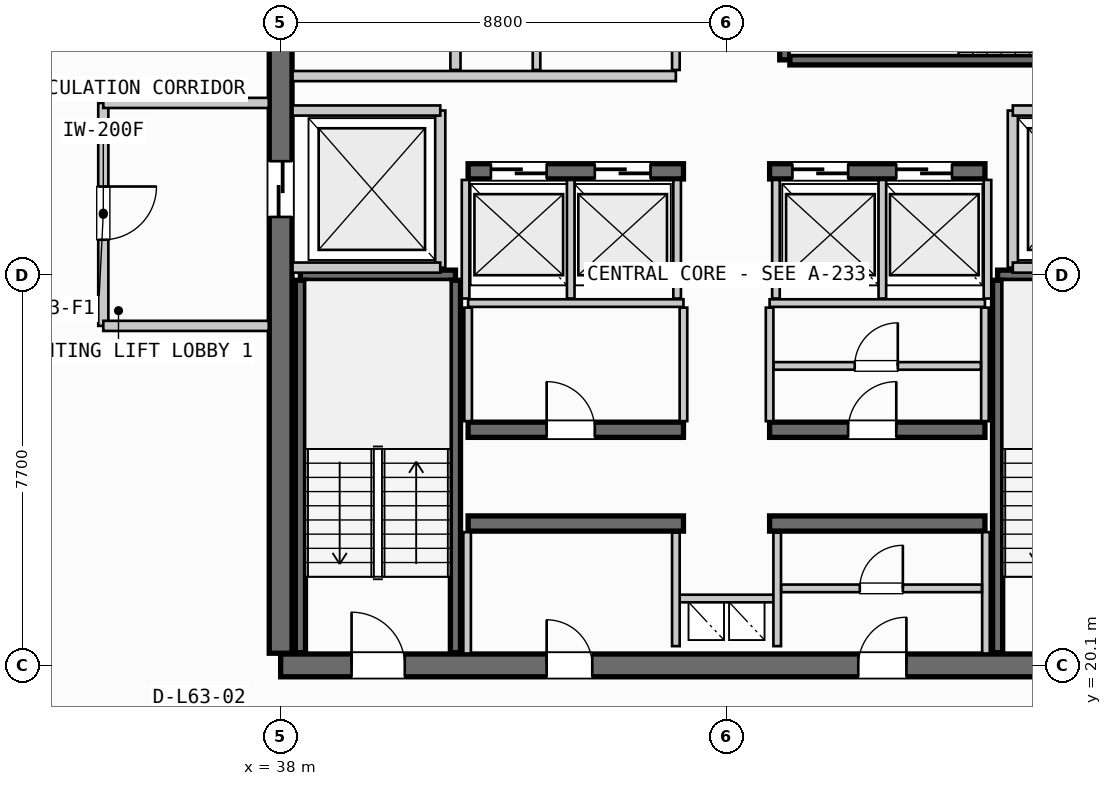
"""IFC4 building model, lengths in metres.
Left out: names, types, materials, properties, quantities, classifications, styles, units other than length and angle.
Written with IfcOpenShell. Run it as: python <this file> out.ifc"""

import sys

from ifc_helpers import new_model, si_unit, direction, frame, frame_2d, origin, place, context, subcontext, project, spatial, rectangle, extrude, source, transform, mapped, element, fill, save


model = new_model("IFC4")
c1 = context("Model", 3, precision=1e-05, world=origin(), true_north=direction((0.0, 1.0)))
c2 = subcontext(c1, "Body", "Model", "MODEL_VIEW")
j1 = project(units=[si_unit("LENGTHUNIT", "METRE"), si_unit("PLANEANGLEUNIT", "RADIAN")], contexts=[c1])
p1 = place(None, origin())
s1 = spatial("IfcSite", under=j1, at=p1, CompositionType="ELEMENT")
p2 = place(p1, origin())
s2 = spatial("IfcBuilding", under=s1, at=p2, CompositionType="ELEMENT")
p3 = place(p2, frame((0.0, 0.0, 242.2)))
s3 = spatial("IfcBuildingStorey", under=s2, at=p3, CompositionType="ELEMENT", Elevation=242.2)
p4 = place(p3, frame((38.0, 20.1, 0.0), z_axis=(0.0, 0.0, 1.0), x_axis=(1.0, 0.0, 0.0)))
e1 = element("IfcWall", 1, at=p4, inside=s3, PredefinedType="SHEAR", context=c2, shape_type="SweptSolid", body=[
    extrude(rectangle(XDim=17.6, YDim=0.45, at=frame_2d((8.8, 0.0))), origin(), (0.0, 0.0, 1.0), 3.21),
])
p5 = place(p4, frame((1.4, 0.0, 0.0)))
e2 = element("IfcOpeningElement", 2, at=p5, cuts=e1, PredefinedType="OPENING", context=c2, shape_type="SweptSolid", body=[
    extrude(rectangle(XDim=1.05, YDim=2.15, at=frame_2d((0.525, 1.075))), frame((0.0, 0.235, 0.0), z_axis=(0.0, -1.0, 0.0), x_axis=(1.0, 0.0, 0.0)), (0.0, 0.0, 1.0), 0.47),
])
p6 = place(p4, frame((15.15, 0.0, 0.0)))
e3 = element("IfcOpeningElement", 3, at=p6, cuts=e1, PredefinedType="OPENING", context=c2, shape_type="SweptSolid", body=[
    extrude(rectangle(XDim=1.05, YDim=2.15, at=frame_2d((0.525, 1.075))), frame((0.0, 0.235, 0.0), z_axis=(0.0, -1.0, 0.0), x_axis=(1.0, 0.0, 0.0)), (0.0, 0.0, 1.0), 0.47),
])
p7 = place(p4, frame((5.25, 0.0, 0.0)))
e4 = element("IfcOpeningElement", 4, at=p7, cuts=e1, PredefinedType="OPENING", context=c2, shape_type="SweptSolid", body=[
    extrude(rectangle(XDim=0.9, YDim=2.15, at=frame_2d((0.45, 1.075))), frame((0.0, 0.235, 0.0), z_axis=(0.0, -1.0, 0.0), x_axis=(1.0, 0.0, 0.0)), (0.0, 0.0, 1.0), 0.47),
])
p8 = place(p4, frame((11.4, 0.0, 0.0)))
e5 = element("IfcOpeningElement", 5, at=p8, cuts=e1, PredefinedType="OPENING", context=c2, shape_type="SweptSolid", body=[
    extrude(rectangle(XDim=0.95, YDim=2.15, at=frame_2d((0.475, 1.075))), frame((0.0, 0.235, 0.0), z_axis=(0.0, -1.0, 0.0), x_axis=(1.0, 0.0, 0.0)), (0.0, 0.0, 1.0), 0.47),
])
p9 = place(p3, frame((38.0, 35.26, 0.0), z_axis=(0.0, 0.0, 1.0), x_axis=(0.0, -1.0, 0.0)))
e6 = element("IfcWall", 6, at=p9, inside=s3, PredefinedType="SHEAR", context=c2, shape_type="SweptSolid", body=[
    extrude(rectangle(XDim=14.92, YDim=0.45, at=frame_2d((7.46, 0.0))), origin(), (0.0, 0.0, 1.0), 3.21),
])
p10 = place(p9, frame((5.21, 0.0, 0.0)))
e7 = element("IfcOpeningElement", 7, at=p10, cuts=e6, PredefinedType="OPENING", context=c2, shape_type="SweptSolid", body=[
    extrude(rectangle(XDim=1.1, YDim=2.2, at=frame_2d((0.55, 1.1))), frame((0.0, 0.235, 0.0), z_axis=(0.0, -1.0, 0.0), x_axis=(1.0, 0.0, 0.0)), (0.0, 0.0, 1.0), 0.47),
])
for number, where, z_axis, x_axis in (
    (8, (41.7, 22.9, 0.0), (0.0, 0.0, 1.0), (1.0, 0.0, 0.0)),
    (9, (47.65, 22.9, 0.0), (0.0, 0.0, 1.0), (1.0, 0.0, 0.0)),
):
    element("IfcWall", number, at=place(p3, frame(where, z_axis=z_axis, x_axis=x_axis)), inside=s3, PredefinedType="SHEAR", context=c2, shape_type="SweptSolid", body=[
        extrude(rectangle(XDim=4.25, YDim=0.3, at=frame_2d((2.125, 0.0))), origin(), (0.0, 0.0, 1.0), 3.21),
    ])
p11 = place(p3, frame((41.7, 24.75, 0.0), z_axis=(0.0, 0.0, 1.0), x_axis=(1.0, 0.0, 0.0)))
e10 = element("IfcWall", 10, at=p11, inside=s3, PredefinedType="SHEAR", context=c2, shape_type="SweptSolid", body=[
    extrude(rectangle(XDim=4.25, YDim=0.3, at=frame_2d((2.125, 0.0))), origin(), (0.0, 0.0, 1.0), 3.21),
])
p12 = place(p11, frame((1.55, 0.0, 0.0)))
e11 = element("IfcOpeningElement", 11, at=p12, cuts=e10, PredefinedType="OPENING", context=c2, shape_type="SweptSolid", body=[
    extrude(rectangle(XDim=0.95, YDim=2.15, at=frame_2d((0.475, 1.075))), frame((0.0, 0.16, 0.0), z_axis=(0.0, -1.0, 0.0), x_axis=(1.0, 0.0, 0.0)), (0.0, 0.0, 1.0), 0.32),
])
p13 = place(p3, frame((47.65, 24.75, 0.0), z_axis=(0.0, 0.0, 1.0), x_axis=(1.0, 0.0, 0.0)))
e12 = element("IfcWall", 12, at=p13, inside=s3, PredefinedType="SHEAR", context=c2, shape_type="SweptSolid", body=[
    extrude(rectangle(XDim=4.25, YDim=0.3, at=frame_2d((2.125, 0.0))), origin(), (0.0, 0.0, 1.0), 3.21),
])
p14 = place(p13, frame((1.55, 0.0, 0.0)))
e13 = element("IfcOpeningElement", 13, at=p14, cuts=e12, PredefinedType="OPENING", context=c2, shape_type="SweptSolid", body=[
    extrude(rectangle(XDim=0.95, YDim=2.15, at=frame_2d((0.475, 1.075))), frame((0.0, 0.16, 0.0), z_axis=(0.0, -1.0, 0.0), x_axis=(1.0, 0.0, 0.0)), (0.0, 0.0, 1.0), 0.32),
])
p15 = place(p3, frame((41.7, 29.85, 0.0), z_axis=(0.0, 0.0, 1.0), x_axis=(1.0, 0.0, 0.0)))
e14 = element("IfcWall", 14, at=p15, inside=s3, PredefinedType="SHEAR", context=c2, shape_type="SweptSolid", body=[
    extrude(rectangle(XDim=4.25, YDim=0.3, at=frame_2d((2.125, 0.0))), origin(), (0.0, 0.0, 1.0), 3.21),
])
p16 = place(p15, frame((0.45, 0.0, 0.0)))
e15 = element("IfcOpeningElement", 15, at=p16, cuts=e14, PredefinedType="OPENING", context=c2, shape_type="SweptSolid", body=[
    extrude(rectangle(XDim=1.1, YDim=2.2, at=frame_2d((0.55, 1.1))), frame((0.0, 0.16, 0.0), z_axis=(0.0, -1.0, 0.0), x_axis=(1.0, 0.0, 0.0)), (0.0, 0.0, 1.0), 0.32),
])
p17 = place(p15, frame((2.5, 0.0, 0.0)))
e16 = element("IfcOpeningElement", 16, at=p17, cuts=e14, PredefinedType="OPENING", context=c2, shape_type="SweptSolid", body=[
    extrude(rectangle(XDim=1.1, YDim=2.2, at=frame_2d((0.55, 1.1))), frame((0.0, 0.16, 0.0), z_axis=(0.0, -1.0, 0.0), x_axis=(1.0, 0.0, 0.0)), (0.0, 0.0, 1.0), 0.32),
])
p18 = place(p3, frame((47.65, 29.85, 0.0), z_axis=(0.0, 0.0, 1.0), x_axis=(1.0, 0.0, 0.0)))
e17 = element("IfcWall", 17, at=p18, inside=s3, PredefinedType="SHEAR", context=c2, shape_type="SweptSolid", body=[
    extrude(rectangle(XDim=4.25, YDim=0.3, at=frame_2d((2.125, 0.0))), origin(), (0.0, 0.0, 1.0), 3.21),
])
p19 = place(p18, frame((0.45, 0.0, 0.0)))
e18 = element("IfcOpeningElement", 18, at=p19, cuts=e17, PredefinedType="OPENING", context=c2, shape_type="SweptSolid", body=[
    extrude(rectangle(XDim=1.1, YDim=2.2, at=frame_2d((0.55, 1.1))), frame((0.0, 0.16, 0.0), z_axis=(0.0, -1.0, 0.0), x_axis=(1.0, 0.0, 0.0)), (0.0, 0.0, 1.0), 0.32),
])
p20 = place(p18, frame((2.5, 0.0, 0.0)))
e19 = element("IfcOpeningElement", 19, at=p20, cuts=e17, PredefinedType="OPENING", context=c2, shape_type="SweptSolid", body=[
    extrude(rectangle(XDim=1.1, YDim=2.2, at=frame_2d((0.55, 1.1))), frame((0.0, 0.16, 0.0), z_axis=(0.0, -1.0, 0.0), x_axis=(1.0, 0.0, 0.0)), (0.0, 0.0, 1.0), 0.32),
])
p21 = place(p3, frame((38.39, 27.8, 0.0), z_axis=(0.0, 0.0, 1.0), x_axis=(1.0, 0.0, 0.0)))
e20 = element("IfcWall", 20, at=p21, inside=s3, PredefinedType="SHEAR", context=c2, shape_type="SweptSolid", body=[
    extrude(rectangle(XDim=3.06, YDim=0.2, at=frame_2d((1.53, 0.0))), origin(), (0.0, 0.0, 1.0), 3.21),
])
for number, where, z_axis, x_axis in (
    (21, (41.45, 27.7, 0.0), (0.0, 0.0, 1.0), (0.0, -1.0, 0.0)),
    (22, (38.39, 20.35, 0.0), (0.0, 0.0, 1.0), (0.0, 1.0, 0.0)),
):
    element("IfcWall", number, at=place(p3, frame(where, z_axis=z_axis, x_axis=x_axis)), inside=s3, PredefinedType="SHEAR", context=c2, shape_type="SweptSolid", body=[
        extrude(rectangle(XDim=7.35, YDim=0.2, at=frame_2d((3.675, 0.0))), origin(), (0.0, 0.0, 1.0), 3.21),
    ])
p22 = place(p3, frame((52.15, 27.8, 0.0), z_axis=(0.0, 0.0, 1.0), x_axis=(1.0, 0.0, 0.0)))
e23 = element("IfcWall", 23, at=p22, inside=s3, PredefinedType="SHEAR", context=c2, shape_type="SweptSolid", body=[
    extrude(rectangle(XDim=3.06, YDim=0.2, at=frame_2d((1.53, 0.0))), origin(), (0.0, 0.0, 1.0), 3.21),
])
p23 = place(p3, frame((52.15, 20.35, 0.0), z_axis=(0.0, 0.0, 1.0), x_axis=(0.0, 1.0, 0.0)))
e24 = element("IfcWall", 24, at=p23, inside=s3, PredefinedType="SHEAR", context=c2, shape_type="SweptSolid", body=[
    extrude(rectangle(XDim=7.35, YDim=0.2, at=frame_2d((3.675, 0.0))), origin(), (0.0, 0.0, 1.0), 3.21),
])
p24 = place(p3, frame((47.95, 32.05, 0.0), z_axis=(0.0, 0.0, 1.0), x_axis=(0.0, 1.0, 0.0)))
e25 = element("IfcWall", 25, at=p24, inside=s3, PredefinedType="SHEAR", context=c2, shape_type="SweptSolid", body=[
    extrude(rectangle(XDim=3.06, YDim=0.2, at=frame_2d((1.53, 0.0))), origin(), (0.0, 0.0, 1.0), 3.21),
])
p25 = place(p3, frame((55.4, 32.05, 0.0), z_axis=(0.0, 0.0, 1.0), x_axis=(-1.0, 0.0, 0.0)))
e26 = element("IfcWall", 26, at=p25, inside=s3, PredefinedType="SHEAR", context=c2, shape_type="SweptSolid", body=[
    extrude(rectangle(XDim=7.35, YDim=0.2, at=frame_2d((3.675, 0.0))), origin(), (0.0, 0.0, 1.0), 3.21),
])
p26 = place(p3, frame((45.8, 21.42, 0.0), z_axis=(0.0, 0.0, 1.0), x_axis=(1.0, 0.0, 0.0)))
e27 = element("IfcWall", 27, at=p26, inside=s3, PredefinedType="PARTITIONING", context=c2, shape_type="SweptSolid", body=[
    extrude(rectangle(XDim=2.0, YDim=0.15, at=frame_2d((1.0, 0.0))), origin(), (0.0, 0.0, 1.0), 2.28),
])
for number, where, z_axis, x_axis in (
    (28, (45.8, 20.48, 0.0), (0.0, 0.0, 1.0), (0.0, 1.0, 0.0)),
    (29, (47.8, 20.48, 0.0), (0.0, 0.0, 1.0), (0.0, 1.0, 0.0)),
):
    element("IfcWall", number, at=place(p3, frame(where, z_axis=z_axis, x_axis=x_axis)), inside=s3, PredefinedType="PARTITIONING", context=c2, shape_type="SweptSolid", body=[
        extrude(rectangle(XDim=2.24, YDim=0.15, at=frame_2d((1.12, 0.0))), origin(), (0.0, 0.0, 1.0), 2.28),
    ])
p27 = place(p3, frame((41.15, 27.95, 0.0), z_axis=(0.0, 0.0, 1.0), x_axis=(0.0, 1.0, 0.0)))
e30 = element("IfcWall", 30, at=p27, inside=s3, PredefinedType="PARTITIONING", context=c2, shape_type="SweptSolid", body=[
    extrude(rectangle(XDim=3.1, YDim=0.2, at=frame_2d((1.55, 0.0))), origin(), (0.0, 0.0, 1.0), 2.28),
])
for number, where, z_axis, x_axis in (
    (31, (38.235, 27.95, 0.0), (0.0, 0.0, 1.0), (1.0, 0.0, 0.0)),
    (32, (38.235, 31.05, 0.0), (0.0, 0.0, 1.0), (1.0, 0.0, 0.0)),
):
    element("IfcWall", number, at=place(p3, frame(where, z_axis=z_axis, x_axis=x_axis)), inside=s3, PredefinedType="PARTITIONING", context=c2, shape_type="SweptSolid", body=[
        extrude(rectangle(XDim=2.915, YDim=0.2, at=frame_2d((1.458, 0.0))), origin(), (0.0, 0.0, 1.0), 2.28),
    ])
p28 = place(p3, frame((34.5, 31.2, 0.0), z_axis=(0.0, 0.0, 1.0), x_axis=(0.0, -1.0, 0.0)))
e33 = element("IfcWall", 33, at=p28, inside=s3, PredefinedType="PARTITIONING", context=c2, shape_type="SweptSolid", body=[
    extrude(rectangle(XDim=4.4, YDim=0.2, at=frame_2d((2.2, 0.0))), origin(), (0.0, 0.0, 1.0), 2.28),
])
p29 = place(p28, frame((1.65, 0.0, 0.0)))
e34 = element("IfcOpeningElement", 34, at=p29, cuts=e33, PredefinedType="OPENING", context=c2, shape_type="SweptSolid", body=[
    extrude(rectangle(XDim=1.05, YDim=2.15, at=frame_2d((0.525, 1.075))), frame((0.0, 0.11, 0.0), z_axis=(0.0, -1.0, 0.0), x_axis=(1.0, 0.0, 0.0)), (0.0, 0.0, 1.0), 0.22),
])
for number, where, z_axis, x_axis in (
    (35, (34.5, 26.8, 0.0), (0.0, 0.0, 1.0), (1.0, 0.0, 0.0)),
    (36, (34.5, 31.2, 0.0), (0.0, 0.0, 1.0), (1.0, 0.0, 0.0)),
):
    element("IfcWall", number, at=place(p3, frame(where, z_axis=z_axis, x_axis=x_axis)), inside=s3, PredefinedType="PARTITIONING", context=c2, shape_type="SweptSolid", body=[
        extrude(rectangle(XDim=3.265, YDim=0.2, at=frame_2d((1.632, 0.0))), origin(), (0.0, 0.0, 1.0), 2.28),
    ])
p30 = place(p3, frame((52.45, 27.95, 0.0), z_axis=(0.0, 0.0, 1.0), x_axis=(0.0, 1.0, 0.0)))
e37 = element("IfcWall", 37, at=p30, inside=s3, PredefinedType="PARTITIONING", context=c2, shape_type="SweptSolid", body=[
    extrude(rectangle(XDim=3.1, YDim=0.2, at=frame_2d((1.55, 0.0))), origin(), (0.0, 0.0, 1.0), 2.28),
])
for number, where, z_axis, x_axis in (
    (38, (52.45, 27.95, 0.0), (0.0, 0.0, 1.0), (1.0, 0.0, 0.0)),
    (39, (52.45, 31.05, 0.0), (0.0, 0.0, 1.0), (1.0, 0.0, 0.0)),
):
    element("IfcWall", number, at=place(p3, frame(where, z_axis=z_axis, x_axis=x_axis)), inside=s3, PredefinedType="PARTITIONING", context=c2, shape_type="SweptSolid", body=[
        extrude(rectangle(XDim=2.915, YDim=0.2, at=frame_2d((1.458, 0.0))), origin(), (0.0, 0.0, 1.0), 2.28),
    ])
for number, where, z_axis, x_axis in (
    (40, (41.68, 20.335, 0.0), (0.0, 0.0, 1.0), (0.0, 1.0, 0.0)),
    (41, (51.92, 20.335, 0.0), (0.0, 0.0, 1.0), (0.0, 1.0, 0.0)),
):
    element("IfcWall", number, at=place(p3, frame(where, z_axis=z_axis, x_axis=x_axis)), inside=s3, PredefinedType="PARTITIONING", context=c2, shape_type="SweptSolid", body=[
        extrude(rectangle(XDim=2.395, YDim=0.15, at=frame_2d((1.198, 0.0))), origin(), (0.0, 0.0, 1.0), 2.28),
    ])
p31 = place(p3, frame((47.88, 21.62, 0.0), z_axis=(0.0, 0.0, 1.0), x_axis=(1.0, 0.0, 0.0)))
e42 = element("IfcWall", 42, at=p31, inside=s3, PredefinedType="PARTITIONING", context=c2, shape_type="SweptSolid", body=[
    extrude(rectangle(XDim=3.96, YDim=0.15, at=frame_2d((1.98, 0.0))), origin(), (0.0, 0.0, 1.0), 2.28),
])
p32 = place(p31, frame((1.55, 0.0, 0.0)))
e43 = element("IfcOpeningElement", 43, at=p32, cuts=e42, PredefinedType="OPENING", context=c2, shape_type="SweptSolid", body=[
    extrude(rectangle(XDim=0.85, YDim=2.15, at=frame_2d((0.425, 1.075))), frame((0.0, 0.085, 0.0), z_axis=(0.0, -1.0, 0.0), x_axis=(1.0, 0.0, 0.0)), (0.0, 0.0, 1.0), 0.17),
])
for number, where, z_axis, x_axis in (
    (44, (41.7, 27.25, 0.0), (0.0, 0.0, 1.0), (1.0, 0.0, 0.0)),
    (45, (47.65, 27.25, 0.0), (0.0, 0.0, 1.0), (1.0, 0.0, 0.0)),
):
    element("IfcWall", number, at=place(p3, frame(where, z_axis=z_axis, x_axis=x_axis)), inside=s3, PredefinedType="PARTITIONING", context=c2, shape_type="SweptSolid", body=[
        extrude(rectangle(XDim=4.25, YDim=0.15, at=frame_2d((2.125, 0.0))), origin(), (0.0, 0.0, 1.0), 2.28),
    ])
for number, where, z_axis, x_axis in (
    (46, (41.7, 24.92, 0.0), (0.0, 0.0, 1.0), (0.0, 1.0, 0.0)),
    (47, (45.95, 24.92, 0.0), (0.0, 0.0, 1.0), (0.0, 1.0, 0.0)),
    (48, (47.65, 24.92, 0.0), (0.0, 0.0, 1.0), (0.0, 1.0, 0.0)),
    (49, (51.9, 24.92, 0.0), (0.0, 0.0, 1.0), (0.0, 1.0, 0.0)),
):
    element("IfcWall", number, at=place(p3, frame(where, z_axis=z_axis, x_axis=x_axis)), inside=s3, PredefinedType="PARTITIONING", context=c2, shape_type="SweptSolid", body=[
        extrude(rectangle(XDim=2.24, YDim=0.15, at=frame_2d((1.12, 0.0))), origin(), (0.0, 0.0, 1.0), 2.28),
    ])
p33 = place(p3, frame((47.73, 26.01, 0.0), z_axis=(0.0, 0.0, 1.0), x_axis=(1.0, 0.0, 0.0)))
e50 = element("IfcWall", 50, at=p33, inside=s3, PredefinedType="PARTITIONING", context=c2, shape_type="SweptSolid", body=[
    extrude(rectangle(XDim=4.09, YDim=0.15, at=frame_2d((2.045, 0.0))), origin(), (0.0, 0.0, 1.0), 2.28),
])
p34 = place(p33, frame((1.6, 0.0, 0.0)))
e51 = element("IfcOpeningElement", 51, at=p34, cuts=e50, PredefinedType="OPENING", context=c2, shape_type="SweptSolid", body=[
    extrude(rectangle(XDim=0.85, YDim=2.15, at=frame_2d((0.425, 1.075))), frame((0.0, 0.085, 0.0), z_axis=(0.0, -1.0, 0.0), x_axis=(1.0, 0.0, 0.0)), (0.0, 0.0, 1.0), 0.17),
])
for number, where, z_axis, x_axis in (
    (52, (41.65, 27.34, 0.0), (0.0, 0.0, 1.0), (0.0, 1.0, 0.0)),
    (53, (43.725, 27.34, 0.0), (0.0, 0.0, 1.0), (0.0, 1.0, 0.0)),
    (54, (45.825, 27.34, 0.0), (0.0, 0.0, 1.0), (0.0, 1.0, 0.0)),
    (55, (47.775, 27.34, 0.0), (0.0, 0.0, 1.0), (0.0, 1.0, 0.0)),
    (56, (49.875, 27.34, 0.0), (0.0, 0.0, 1.0), (0.0, 1.0, 0.0)),
    (57, (51.95, 27.34, 0.0), (0.0, 0.0, 1.0), (0.0, 1.0, 0.0)),
):
    element("IfcWall", number, at=place(p3, frame(where, z_axis=z_axis, x_axis=x_axis)), inside=s3, PredefinedType="PARTITIONING", context=c2, shape_type="SweptSolid", body=[
        extrude(rectangle(XDim=2.34, YDim=0.15, at=frame_2d((1.17, 0.0))), origin(), (0.0, 0.0, 1.0), 2.28),
    ])
p35 = place(p3, frame((41.45, 31.85, 0.0), z_axis=(0.0, 0.0, 1.0), x_axis=(0.0, 1.0, 0.0)))
e58 = element("IfcWall", 58, at=p35, inside=s3, PredefinedType="PARTITIONING", context=c2, shape_type="SweptSolid", body=[
    extrude(rectangle(XDim=3.415, YDim=0.2, at=frame_2d((1.708, 0.0))), origin(), (0.0, 0.0, 1.0), 2.28),
])
p36 = place(p3, frame((38.235, 31.73, 0.0), z_axis=(0.0, 0.0, 1.0), x_axis=(1.0, 0.0, 0.0)))
e59 = element("IfcWall", 59, at=p36, inside=s3, PredefinedType="PARTITIONING", context=c2, shape_type="SweptSolid", body=[
    extrude(rectangle(XDim=7.565, YDim=0.2, at=frame_2d((3.782, 0.0))), origin(), (0.0, 0.0, 1.0), 2.28),
])
p37 = place(p3, frame((45.8, 31.85, 0.0), z_axis=(0.0, 0.0, 1.0), x_axis=(0.0, 1.0, 0.0)))
e60 = element("IfcWall", 60, at=p37, inside=s3, PredefinedType="PARTITIONING", context=c2, shape_type="SweptSolid", body=[
    extrude(rectangle(XDim=3.415, YDim=0.15, at=frame_2d((1.708, 0.0))), origin(), (0.0, 0.0, 1.0), 2.28),
])
p38 = place(p3, frame((43.05, 31.85, 0.0), z_axis=(0.0, 0.0, 1.0), x_axis=(0.0, 1.0, 0.0)))
e61 = element("IfcWall", 61, at=p38, inside=s3, PredefinedType="PLUMBINGWALL", context=c2, shape_type="SweptSolid", body=[
    extrude(rectangle(XDim=3.415, YDim=0.15, at=frame_2d((1.708, 0.0))), origin(), (0.0, 0.0, 1.0), 2.28),
])
m1 = source(origin(), c2, "Body", "SweptSolid", [
    extrude(rectangle(XDim=1.05, YDim=2.15, at=frame_2d((0.525, 1.075))), frame((0.0, 0.025, 0.0), z_axis=(0.0, -1.0, 0.0), x_axis=(1.0, 0.0, 0.0)), (0.0, 0.0, 1.0), 0.05),
])
p39 = place(p5, origin())
e62 = element("IfcDoor", 62, at=p39, inside=s3, OperationType="SINGLE_SWING_LEFT", PredefinedType="DOOR", context=c2, shape_type="MappedRepresentation", body=[
    mapped(m1, transform((0.0, 0.0, 0.0), scale=1.0)),
])
fill(e2, e62)
m2 = source(origin(), c2, "Body", "SweptSolid", [
    extrude(rectangle(XDim=1.1, YDim=2.2, at=frame_2d((0.55, 1.1))), frame((0.0, 0.025, 0.0), z_axis=(0.0, -1.0, 0.0), x_axis=(1.0, 0.0, 0.0)), (0.0, 0.0, 1.0), 0.05),
])
p40 = place(p10, origin())
e63 = element("IfcDoor", 63, at=p40, inside=s3, OperationType="SLIDING_TO_LEFT", PredefinedType="DOOR", context=c2, shape_type="MappedRepresentation", body=[
    mapped(m2, transform((0.0, 0.0, 0.0), scale=1.0)),
])
fill(e7, e63)
m3 = source(origin(), c2, "Body", "SweptSolid", [
    extrude(rectangle(XDim=0.9, YDim=2.15, at=frame_2d((0.45, 1.075))), frame((0.0, 0.025, 0.0), z_axis=(0.0, -1.0, 0.0), x_axis=(1.0, 0.0, 0.0)), (0.0, 0.0, 1.0), 0.05),
])
p41 = place(p7, origin())
e64 = element("IfcDoor", 64, at=p41, inside=s3, OperationType="SINGLE_SWING_LEFT", PredefinedType="DOOR", context=c2, shape_type="MappedRepresentation", body=[
    mapped(m3, transform((0.0, 0.0, 0.0), scale=1.0)),
])
fill(e4, e64)
m4 = source(origin(), c2, "Body", "SweptSolid", [
    extrude(rectangle(XDim=0.95, YDim=2.15, at=frame_2d((0.475, 1.075))), frame((0.0, 0.025, 0.0), z_axis=(0.0, -1.0, 0.0), x_axis=(1.0, 0.0, 0.0)), (0.0, 0.0, 1.0), 0.05),
])
p42 = place(p8, origin())
e65 = element("IfcDoor", 65, at=p42, inside=s3, OperationType="SINGLE_SWING_RIGHT", PredefinedType="DOOR", context=c2, shape_type="MappedRepresentation", body=[
    mapped(m4, transform((0.0, 0.0, 0.0), scale=1.0)),
])
fill(e5, e65)
p43 = place(p12, origin())
e66 = element("IfcDoor", 66, at=p43, inside=s3, OperationType="SINGLE_SWING_LEFT", PredefinedType="DOOR", context=c2, shape_type="MappedRepresentation", body=[
    mapped(m4, transform((0.0, 0.0, 0.0), scale=1.0)),
])
fill(e11, e66)
p44 = place(p14, origin())
e67 = element("IfcDoor", 67, at=p44, inside=s3, OperationType="SINGLE_SWING_RIGHT", PredefinedType="DOOR", context=c2, shape_type="MappedRepresentation", body=[
    mapped(m4, transform((0.0, 0.0, 0.0), scale=1.0)),
])
fill(e13, e67)
p45 = place(p16, origin())
e68 = element("IfcDoor", 68, at=p45, inside=s3, OperationType="SLIDING_TO_LEFT", PredefinedType="DOOR", context=c2, shape_type="MappedRepresentation", body=[
    mapped(m2, transform((0.0, 0.0, 0.0), scale=1.0)),
])
fill(e15, e68)
p46 = place(p17, origin())
e69 = element("IfcDoor", 69, at=p46, inside=s3, OperationType="SLIDING_TO_LEFT", PredefinedType="DOOR", context=c2, shape_type="MappedRepresentation", body=[
    mapped(m2, transform((0.0, 0.0, 0.0), scale=1.0)),
])
fill(e16, e69)
p47 = place(p19, origin())
e70 = element("IfcDoor", 70, at=p47, inside=s3, OperationType="SLIDING_TO_LEFT", PredefinedType="DOOR", context=c2, shape_type="MappedRepresentation", body=[
    mapped(m2, transform((0.0, 0.0, 0.0), scale=1.0)),
])
fill(e18, e70)
p48 = place(p20, origin())
e71 = element("IfcDoor", 71, at=p48, inside=s3, OperationType="SLIDING_TO_LEFT", PredefinedType="DOOR", context=c2, shape_type="MappedRepresentation", body=[
    mapped(m2, transform((0.0, 0.0, 0.0), scale=1.0)),
])
fill(e19, e71)
p49 = place(p29, origin())
e72 = element("IfcDoor", 72, at=p49, inside=s3, OperationType="SINGLE_SWING_LEFT", PredefinedType="DOOR", context=c2, shape_type="MappedRepresentation", body=[
    mapped(m1, transform((0.0, 0.0, 0.0), scale=1.0)),
])
fill(e34, e72)
m5 = source(origin(), c2, "Body", "SweptSolid", [
    extrude(rectangle(XDim=0.85, YDim=2.15, at=frame_2d((0.425, 1.075))), frame((0.0, 0.025, 0.0), z_axis=(0.0, -1.0, 0.0), x_axis=(1.0, 0.0, 0.0)), (0.0, 0.0, 1.0), 0.05),
])
p50 = place(p32, origin())
e73 = element("IfcDoor", 73, at=p50, inside=s3, OperationType="SINGLE_SWING_RIGHT", PredefinedType="DOOR", context=c2, shape_type="MappedRepresentation", body=[
    mapped(m5, transform((0.0, 0.0, 0.0), scale=1.0)),
])
fill(e43, e73)
p51 = place(p34, origin())
e74 = element("IfcDoor", 74, at=p51, inside=s3, OperationType="SINGLE_SWING_RIGHT", PredefinedType="DOOR", context=c2, shape_type="MappedRepresentation", body=[
    mapped(m5, transform((0.0, 0.0, 0.0), scale=1.0)),
])
fill(e51, e74)
save(model, sys.argv[1])
